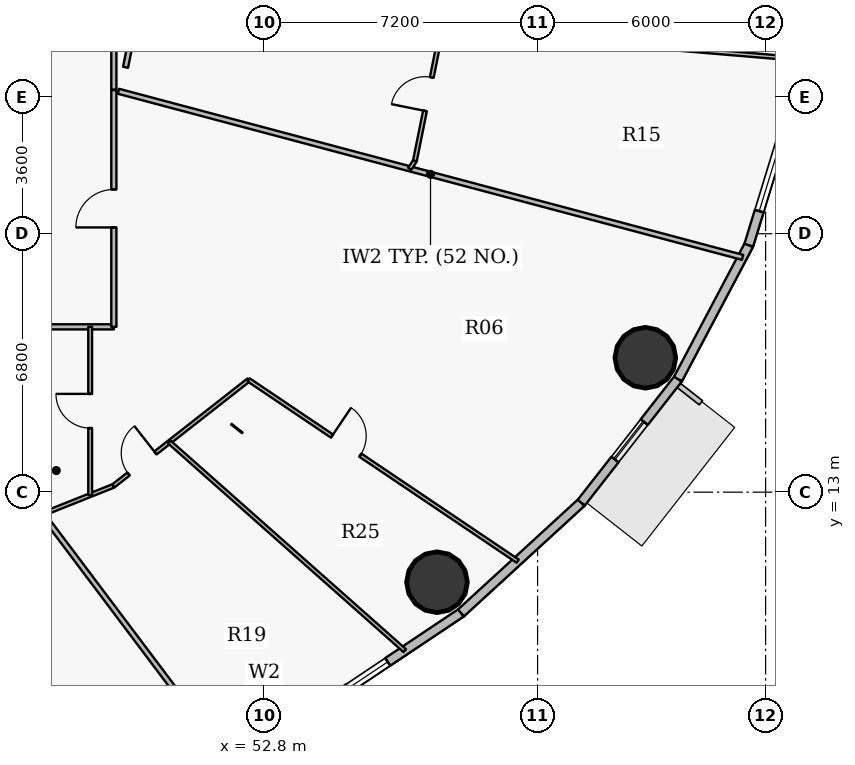
"""IFC4 building model, lengths in metres.
Left out: names, types, materials, properties, quantities, classifications, styles, units other than length and angle.
Written with IfcOpenShell. Run it as: python <this file> out.ifc"""

import sys

from ifc_helpers import new_model, si_unit, direction, frame, frame_2d, origin, origin_2d, place, context, subcontext, project, spatial, rectangle, hollow_circle, extrude, source, transform, mapped, element, fill, save


model = new_model("IFC4")
c1 = context("Model", 3, precision=1e-05, world=origin(), true_north=direction((0.0, 1.0)))
c2 = subcontext(c1, "Body", "Model", "MODEL_VIEW")
j1 = project(units=[si_unit("LENGTHUNIT", "METRE"), si_unit("PLANEANGLEUNIT", "RADIAN")], contexts=[c1])
p1 = place(None, origin())
s1 = spatial("IfcSite", under=j1, at=p1, CompositionType="ELEMENT")
p2 = place(p1, origin())
s2 = spatial("IfcBuilding", under=s1, at=p2, CompositionType="ELEMENT")
p3 = place(p2, frame((0.0, 0.0, 74.4)))
s3 = spatial("IfcBuildingStorey", under=s2, at=p3, CompositionType="ELEMENT", Elevation=74.4)
for number, where, z_axis, x_axis in (
    (1, (57.353, 10.631, 0.0), (0.0, 0.0, 1.0), (1.0, 0.0, 0.0)),
    (2, (62.835, 16.536, 0.0), (0.0, 0.0, 1.0), (1.0, 0.0, 0.0)),
):
    element("IfcColumn", number, at=place(p3, frame(where, z_axis=z_axis, x_axis=x_axis)), inside=s3, PredefinedType="COLUMN", context=c2, shape_type="SweptSolid", body=[
        extrude(hollow_circle(Radius=0.8, WallThickness=0.045, at=origin_2d()), origin(), (0.0, 0.0, 1.0), 4.2),
    ])
p4 = place(p3, frame((57.985, 9.824, 0.0), z_axis=(0.0, 0.0, 1.0), x_axis=(-0.831240982525, -0.555912249343, 0.0)))
e3 = element("IfcWall", 3, at=p4, inside=s3, PredefinedType="SOLIDWALL", context=c2, shape_type="SweptSolid", body=[
    extrude(rectangle(XDim=4.46, YDim=0.24, at=frame_2d((2.23, 0.0))), origin(), (0.0, 0.0, 1.0), 3.95),
])
p5 = place(p4, frame((2.318, 0.0, 0.9)))
e4 = element("IfcOpeningElement", 4, at=p5, cuts=e3, PredefinedType="OPENING", context=c2, shape_type="SweptSolid", body=[
    extrude(rectangle(XDim=1.25, YDim=1.65, at=origin_2d()), frame((0.625, 0.13, 0.825), z_axis=(0.0, -1.0, 0.0), x_axis=(1.0, 0.0, 0.0)), (0.0, 0.0, 1.0), 0.26),
])
p6 = place(p3, frame((61.15, 12.725, 0.0), z_axis=(0.0, 0.0, 1.0), x_axis=(-0.737116376281, -0.67576582321, 0.0)))
e5 = element("IfcWall", 5, at=p6, inside=s3, PredefinedType="SOLIDWALL", context=c2, shape_type="SweptSolid", body=[
    extrude(rectangle(XDim=4.294, YDim=0.24, at=frame_2d((2.147, 0.0))), origin(), (0.0, 0.0, 1.0), 3.95),
])
p7 = place(p3, frame((63.695, 15.977, 0.0), z_axis=(0.0, 0.0, 1.0), x_axis=(-0.616295508253, -0.787514981767, 0.0)))
e6 = element("IfcWall", 6, at=p7, inside=s3, PredefinedType="SOLIDWALL", context=c2, shape_type="SweptSolid", body=[
    extrude(rectangle(XDim=4.129, YDim=0.24, at=frame_2d((2.065, 0.0))), origin(), (0.0, 0.0, 1.0), 3.95),
])
p8 = place(p7, frame((1.44, 0.0, 0.9)))
e7 = element("IfcOpeningElement", 7, at=p8, cuts=e6, PredefinedType="OPENING", context=c2, shape_type="SweptSolid", body=[
    extrude(rectangle(XDim=1.25, YDim=1.65, at=origin_2d()), frame((0.625, 0.13, 0.825), z_axis=(0.0, -1.0, 0.0), x_axis=(1.0, 0.0, 0.0)), (0.0, 0.0, 1.0), 0.26),
])
p9 = place(p3, frame((65.558, 19.499, 0.0), z_axis=(0.0, 0.0, 1.0), x_axis=(-0.467662443071, -0.883907144072, 0.0)))
e8 = element("IfcWall", 8, at=p9, inside=s3, PredefinedType="SOLIDWALL", context=c2, shape_type="SweptSolid", body=[
    extrude(rectangle(XDim=3.984, YDim=0.24, at=frame_2d((1.992, 0.0))), origin(), (0.0, 0.0, 1.0), 3.95),
])
p10 = place(p3, frame((66.693, 23.203, 0.0), z_axis=(0.0, 0.0, 1.0), x_axis=(-0.293111631758, -0.956078224482, 0.0)))
e9 = element("IfcWall", 9, at=p10, inside=s3, PredefinedType="SOLIDWALL", context=c2, shape_type="SweptSolid", body=[
    extrude(rectangle(XDim=3.875, YDim=0.24, at=frame_2d((1.938, 0.0))), origin(), (0.0, 0.0, 1.0), 3.95),
])
p11 = place(p10, frame((0.938, 0.0, 0.9)))
e10 = element("IfcOpeningElement", 10, at=p11, cuts=e9, PredefinedType="OPENING", context=c2, shape_type="SweptSolid", body=[
    extrude(rectangle(XDim=2.0, YDim=1.75, at=origin_2d()), frame((1.0, 0.13, 0.875), z_axis=(0.0, -1.0, 0.0), x_axis=(1.0, 0.0, 0.0)), (0.0, 0.0, 1.0), 0.26),
])
p12 = place(p3, frame((41.679, 17.35, 0.0), z_axis=(0.0, 0.0, 1.0), x_axis=(1.0, 0.0, 0.0)))
e11 = element("IfcWall", 11, at=p12, inside=s3, PredefinedType="PARTITIONING", context=c2, shape_type="SweptSolid", body=[
    extrude(rectangle(XDim=7.171, YDim=0.135, at=frame_2d((3.586, 0.0))), origin(), (0.0, 0.0, 1.0), 3.285),
])
p13 = place(p3, frame((42.749, 10.736, 0.0), z_axis=(0.0, 0.0, 1.0), x_axis=(0.928807683782, 0.370562122386, 0.0)))
e12 = element("IfcWall", 12, at=p13, inside=s3, PredefinedType="PARTITIONING", context=c2, shape_type="SweptSolid", body=[
    extrude(rectangle(XDim=6.555, YDim=0.1, at=frame_2d((3.277, 0.0))), origin(), (0.0, 0.0, 1.0), 3.285),
])
p14 = place(p3, frame((43.263, 17.35, 0.0), z_axis=(0.0, 0.0, 1.0), x_axis=(0.601348900386, -0.798986545571, 0.0)))
e13 = element("IfcWall", 13, at=p14, inside=s3, PredefinedType="PARTITIONING", context=c2, shape_type="SweptSolid", body=[
    extrude(rectangle(XDim=14.065, YDim=0.135, at=frame_2d((7.032, 0.0))), origin(), (0.0, 0.0, 1.0), 3.335),
])
p15 = place(p3, frame((48.227, 12.921, 0.0), z_axis=(0.0, 0.0, 1.0), x_axis=(0.0, 1.0, 0.0)))
e14 = element("IfcWall", 14, at=p15, inside=s3, PredefinedType="PARTITIONING", context=c2, shape_type="SweptSolid", body=[
    extrude(rectangle(XDim=4.429, YDim=0.1, at=frame_2d((2.214, 0.0))), origin(), (0.0, 0.0, 1.0), 3.95),
])
p16 = place(p15, frame((1.764, 0.0, 0.0)))
e15 = element("IfcOpeningElement", 15, at=p16, cuts=e14, PredefinedType="OPENING", context=c2, shape_type="SweptSolid", body=[
    extrude(rectangle(XDim=0.9, YDim=2.1, at=origin_2d()), frame((0.45, 0.06, 1.05), z_axis=(0.0, -1.0, 0.0), x_axis=(1.0, 0.0, 0.0)), (0.0, 0.0, 1.0), 0.12),
])
p17 = place(p3, frame((48.837, 13.165, 0.0), z_axis=(0.0, 0.0, 1.0), x_axis=(0.787356886128, 0.616497472717, 0.0)))
e16 = element("IfcWall", 16, at=p17, inside=s3, PredefinedType="PARTITIONING", context=c2, shape_type="SweptSolid", body=[
    extrude(rectangle(XDim=4.522, YDim=0.1, at=frame_2d((2.261, 0.0))), origin(), (0.0, 0.0, 1.0), 3.285),
])
p18 = place(p17, frame((0.506, 0.0, 0.0)))
e17 = element("IfcOpeningElement", 17, at=p18, cuts=e16, PredefinedType="OPENING", context=c2, shape_type="SweptSolid", body=[
    extrude(rectangle(XDim=0.9, YDim=2.1, at=origin_2d()), frame((0.45, 0.06, 1.05), z_axis=(0.0, -1.0, 0.0), x_axis=(1.0, 0.0, 0.0)), (0.0, 0.0, 1.0), 0.12),
])
p19 = place(p3, frame((48.85, 17.35, 0.0), z_axis=(0.0, 0.0, 1.0), x_axis=(0.0, 1.0, 0.0)))
e18 = element("IfcWall", 18, at=p19, inside=s3, PredefinedType="PARTITIONING", context=c2, shape_type="SweptSolid", body=[
    extrude(rectangle(XDim=6.23, YDim=0.135, at=frame_2d((3.115, 0.0))), origin(), (0.0, 0.0, 1.0), 3.285),
])
p20 = place(p19, frame((2.615, 0.0, 0.0)))
e19 = element("IfcOpeningElement", 19, at=p20, cuts=e18, PredefinedType="OPENING", context=c2, shape_type="SweptSolid", body=[
    extrude(rectangle(XDim=1.0, YDim=2.15, at=origin_2d()), frame((0.5, 0.078, 1.075), z_axis=(0.0, -1.0, 0.0), x_axis=(1.0, 0.0, 0.0)), (0.0, 0.0, 1.0), 0.155),
])
p21 = place(p3, frame((48.971, 23.548, 0.0), z_axis=(0.0, 0.0, 1.0), x_axis=(0.966368341592, -0.257161871917, 0.0)))
e20 = element("IfcWall", 20, at=p21, inside=s3, PredefinedType="PARTITIONING", context=c2, shape_type="SweptSolid", body=[
    extrude(rectangle(XDim=16.994, YDim=0.135, at=frame_2d((8.497, 0.0))), origin(), (0.0, 0.0, 1.0), 3.335),
])
p22 = place(p3, frame((50.311, 14.319, 0.0), z_axis=(0.0, 0.0, 1.0), x_axis=(0.748425458021, -0.663218918447, 0.0)))
e21 = element("IfcWall", 21, at=p22, inside=s3, PredefinedType="PARTITIONING", context=c2, shape_type="SweptSolid", body=[
    extrude(rectangle(XDim=8.278, YDim=0.1, at=frame_2d((4.139, 0.0))), origin(), (0.0, 0.0, 1.0), 3.335),
])
p23 = place(p3, frame((52.398, 15.953, 0.0), z_axis=(0.0, 0.0, 1.0), x_axis=(0.829356044666, -0.558720458884, 0.0)))
e22 = element("IfcWall", 22, at=p23, inside=s3, PredefinedType="PARTITIONING", context=c2, shape_type="SweptSolid", body=[
    extrude(rectangle(XDim=8.535, YDim=0.1, at=frame_2d((4.267, 0.0))), origin(), (0.0, 0.0, 1.0), 3.335),
])
p24 = place(p23, frame((2.643, 0.0, 0.0)))
e23 = element("IfcOpeningElement", 23, at=p24, cuts=e22, PredefinedType="OPENING", context=c2, shape_type="SweptSolid", body=[
    extrude(rectangle(XDim=0.9, YDim=2.1, at=origin_2d()), frame((0.45, 0.06, 1.05), z_axis=(0.0, -1.0, 0.0), x_axis=(1.0, 0.0, 0.0)), (0.0, 0.0, 1.0), 0.12),
])
p25 = place(p3, frame((56.636, 21.509, 0.0), z_axis=(0.0, 0.0, 1.0), x_axis=(0.544849315021, 0.838533973027, 0.0)))
e24 = element("IfcWall", 24, at=p25, inside=s3, PredefinedType="PARTITIONING", context=c2, shape_type="SweptSolid", body=[
    extrude(rectangle(XDim=0.247, YDim=0.1, at=frame_2d((0.124, 0.0))), origin(), (0.0, 0.0, 1.0), 3.95),
])
p26 = place(p3, frame((56.771, 21.716, 0.0), z_axis=(0.0, 0.0, 1.0), x_axis=(0.198292702032, 0.980142848936, 0.0)))
e25 = element("IfcWall", 25, at=p26, inside=s3, PredefinedType="PARTITIONING", context=c2, shape_type="SweptSolid", body=[
    extrude(rectangle(XDim=5.392, YDim=0.1, at=frame_2d((2.696, 0.0))), origin(), (0.0, 0.0, 1.0), 3.285),
])
p27 = place(p26, frame((1.343, 0.0, 0.0)))
e26 = element("IfcOpeningElement", 26, at=p27, cuts=e25, PredefinedType="OPENING", context=c2, shape_type="SweptSolid", body=[
    extrude(rectangle(XDim=0.9, YDim=2.1, at=origin_2d()), frame((0.45, 0.06, 1.05), z_axis=(0.0, -1.0, 0.0), x_axis=(1.0, 0.0, 0.0)), (0.0, 0.0, 1.0), 0.12),
])
p28 = place(p3, frame((57.474, 25.191, 0.0), z_axis=(0.0, 0.0, 1.0), x_axis=(0.996471574276, -0.083930933863, 0.0)))
e27 = element("IfcWall", 27, at=p28, inside=s3, PredefinedType="PARTITIONING", context=c2, shape_type="SweptSolid", body=[
    extrude(rectangle(XDim=9.378, YDim=0.1, at=frame_2d((4.689, 0.0))), origin(), (0.0, 0.0, 1.0), 3.335),
])
p29 = place(p3, frame((48.85, 27.528, 0.0), z_axis=(0.0, 0.0, 1.0), x_axis=(0.0, -1.0, 0.0)))
e28 = element("IfcWall", 28, at=p29, inside=s3, PredefinedType="PARTITIONING", context=c2, shape_type="SweptSolid", body=[
    extrude(rectangle(XDim=3.938, YDim=0.135, at=frame_2d((1.969, 0.0))), origin(), (0.0, 0.0, 1.0), 3.285),
])
p30 = place(p3, frame((49.157, 24.18, 0.0), z_axis=(0.0, 0.0, 1.0), x_axis=(0.19828576171, 0.980144253007, 0.0)))
e29 = element("IfcWall", 29, at=p30, inside=s3, PredefinedType="PARTITIONING", context=c2, shape_type="SweptSolid", body=[
    extrude(rectangle(XDim=2.877, YDim=0.135, at=frame_2d((1.439, 0.0))), origin(), (0.0, 0.0, 1.0), 3.285),
])
m1 = source(origin(), c2, "Body", "SweptSolid", [
    extrude(rectangle(XDim=1.25, YDim=1.65, at=origin_2d()), frame((0.625, 0.03, 0.825), z_axis=(0.0, -1.0, 0.0), x_axis=(1.0, 0.0, 0.0)), (0.0, 0.0, 1.0), 0.06),
])
p31 = place(p5, origin())
e30 = element("IfcWindow", 30, at=p31, inside=s3, PartitioningType="SINGLE_PANEL", PredefinedType="WINDOW", context=c2, shape_type="MappedRepresentation", body=[
    mapped(m1, transform((0.0, 0.0, 0.0), x_axis=(1.0, 0.0, 0.0), y_axis=(0.0, 1.0, 0.0), z_axis=(0.0, 0.0, 1.0), scale=1.0)),
])
fill(e4, e30)
m2 = source(origin(), c2, "Body", "SweptSolid", [
    extrude(rectangle(XDim=2.0, YDim=1.75, at=origin_2d()), frame((1.0, 0.03, 0.875), z_axis=(0.0, -1.0, 0.0), x_axis=(1.0, 0.0, 0.0)), (0.0, 0.0, 1.0), 0.06),
])
p32 = place(p11, origin())
e31 = element("IfcWindow", 31, at=p32, inside=s3, PartitioningType="DOUBLE_PANEL_VERTICAL", PredefinedType="WINDOW", context=c2, shape_type="MappedRepresentation", body=[
    mapped(m2, transform((0.0, 0.0, 0.0), x_axis=(1.0, 0.0, 0.0), y_axis=(0.0, 1.0, 0.0), z_axis=(0.0, 0.0, 1.0), scale=1.0)),
])
fill(e10, e31)
p33 = place(p8, origin())
e32 = element("IfcWindow", 32, at=p33, inside=s3, PartitioningType="SINGLE_PANEL", PredefinedType="WINDOW", context=c2, shape_type="MappedRepresentation", body=[
    mapped(m1, transform((0.0, 0.0, 0.0), x_axis=(1.0, 0.0, 0.0), y_axis=(0.0, 1.0, 0.0), z_axis=(0.0, 0.0, 1.0), scale=1.0)),
])
fill(e7, e32)
m3 = source(origin(), c2, "Body", "SweptSolid", [
    extrude(rectangle(XDim=1.0, YDim=2.15, at=origin_2d()), frame((0.5, 0.025, 1.075), z_axis=(0.0, -1.0, 0.0), x_axis=(1.0, 0.0, 0.0)), (0.0, 0.0, 1.0), 0.05),
])
p34 = place(p20, origin())
e33 = element("IfcDoor", 33, at=p34, inside=s3, OperationType="SINGLE_SWING_LEFT", PredefinedType="DOOR", context=c2, shape_type="MappedRepresentation", body=[
    mapped(m3, transform((0.0, 0.0, 0.0), x_axis=(1.0, 0.0, 0.0), y_axis=(0.0, 1.0, 0.0), z_axis=(0.0, 0.0, 1.0), scale=1.0)),
])
fill(e19, e33)
m4 = source(origin(), c2, "Body", "SweptSolid", [
    extrude(rectangle(XDim=0.9, YDim=2.1, at=origin_2d()), frame((0.45, 0.025, 1.05), z_axis=(0.0, -1.0, 0.0), x_axis=(1.0, 0.0, 0.0)), (0.0, 0.0, 1.0), 0.05),
])
p35 = place(p18, origin())
e34 = element("IfcDoor", 34, at=p35, inside=s3, OperationType="SINGLE_SWING_RIGHT", PredefinedType="DOOR", context=c2, shape_type="MappedRepresentation", body=[
    mapped(m4, transform((0.0, 0.0, 0.0), x_axis=(1.0, 0.0, 0.0), y_axis=(0.0, 1.0, 0.0), z_axis=(0.0, 0.0, 1.0), scale=1.0)),
])
fill(e17, e34)
p36 = place(p24, origin())
e35 = element("IfcDoor", 35, at=p36, inside=s3, OperationType="SINGLE_SWING_LEFT", PredefinedType="DOOR", context=c2, shape_type="MappedRepresentation", body=[
    mapped(m4, transform((0.0, 0.0, 0.0), x_axis=(1.0, 0.0, 0.0), y_axis=(0.0, 1.0, 0.0), z_axis=(0.0, 0.0, 1.0), scale=1.0)),
])
fill(e23, e35)
p37 = place(p16, origin())
e36 = element("IfcDoor", 36, at=p37, inside=s3, OperationType="SINGLE_SWING_RIGHT", PredefinedType="DOOR", context=c2, shape_type="MappedRepresentation", body=[
    mapped(m4, transform((0.0, 0.0, 0.0), x_axis=(1.0, 0.0, 0.0), y_axis=(0.0, 1.0, 0.0), z_axis=(0.0, 0.0, 1.0), scale=1.0)),
])
fill(e15, e36)
p38 = place(p27, origin())
e37 = element("IfcDoor", 37, at=p38, inside=s3, OperationType="SINGLE_SWING_LEFT", PredefinedType="DOOR", context=c2, shape_type="MappedRepresentation", body=[
    mapped(m4, transform((0.0, 0.0, 0.0), x_axis=(1.0, 0.0, 0.0), y_axis=(0.0, 1.0, 0.0), z_axis=(0.0, 0.0, 1.0), scale=1.0)),
])
fill(e26, e37)
save(model, sys.argv[1])
